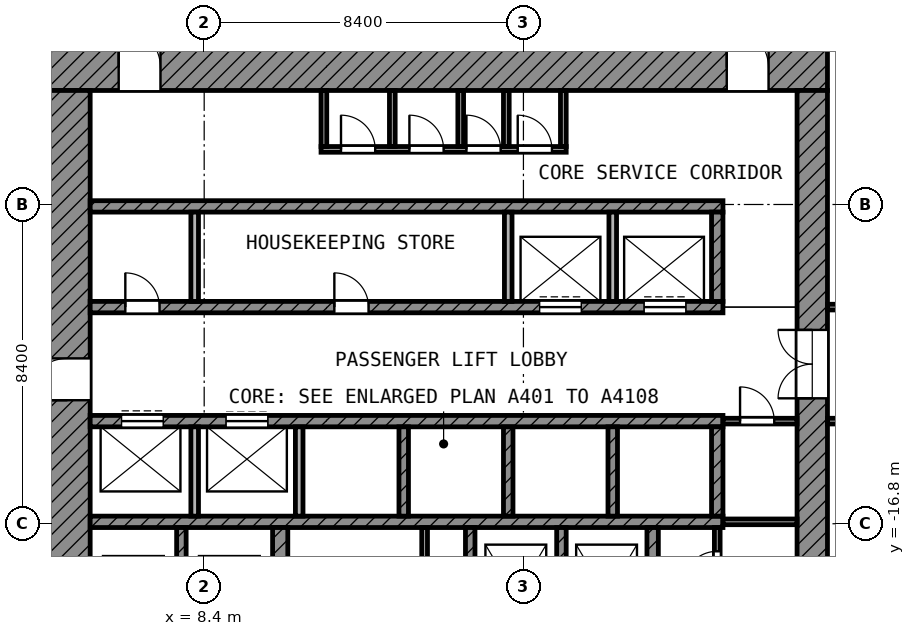
"""IFC4 building model, lengths in metres.
Left out: names, types, materials, properties, quantities, classifications, styles, units other than length and angle.
Written with IfcOpenShell. Run it as: python <this file> out.ifc"""

import sys

from ifc_helpers import new_model, si_unit, direction, frame, frame_2d, origin, place, context, subcontext, project, spatial, rectangle, extrude, element, fill, save


model = new_model("IFC4")
c1 = context("Model", 3, precision=1e-05, world=origin(), true_north=direction((0.0, 1.0)))
c2 = subcontext(c1, "Body", "Model", "MODEL_VIEW")
j1 = project(units=[si_unit("LENGTHUNIT", "METRE"), si_unit("PLANEANGLEUNIT", "RADIAN")], contexts=[c1])
p1 = place(None, origin())
s1 = spatial("IfcSite", under=j1, at=p1, CompositionType="ELEMENT")
p2 = place(p1, origin())
s2 = spatial("IfcBuilding", under=s1, at=p2, CompositionType="ELEMENT")
p3 = place(p2, frame((0.0, 0.0, 243.2)))
s3 = spatial("IfcBuildingStorey", under=s2, at=p3, CompositionType="ELEMENT", Elevation=243.2)
p4 = place(p3, frame((4.2, -4.8, 0.0), z_axis=(0.0, 0.0, 1.0), x_axis=(1.0, 0.0, 0.0)))
e1 = element("IfcWall", 1, at=p4, inside=s3, PredefinedType="SHEAR", context=c2, shape_type="SweptSolid", body=[
    extrude(rectangle(XDim=20.6, YDim=1.2, at=frame_2d((10.3, 0.0))), origin(), (0.0, 0.0, 1.0), 3.6),
])
p5 = place(p4, frame((1.95, 0.0, 0.0)))
e2 = element("IfcOpeningElement", 2, at=p5, cuts=e1, PredefinedType="OPENING", context=c2, shape_type="SweptSolid", body=[
    extrude(rectangle(XDim=1.1, YDim=2.1, at=frame_2d((0.55, 1.05))), frame((0.0, 0.61, 0.0), z_axis=(0.0, -1.0, 0.0), x_axis=(1.0, 0.0, 0.0)), (0.0, 0.0, 1.0), 1.22),
])
p6 = place(p4, frame((17.95, 0.0, 0.0)))
e3 = element("IfcOpeningElement", 3, at=p6, cuts=e1, PredefinedType="OPENING", context=c2, shape_type="SweptSolid", body=[
    extrude(rectangle(XDim=1.1, YDim=2.1, at=frame_2d((0.55, 1.05))), frame((0.0, 0.61, 0.0), z_axis=(0.0, -1.0, 0.0), x_axis=(1.0, 0.0, 0.0)), (0.0, 0.0, 1.0), 1.22),
])
p7 = place(p3, frame((4.8, -24.8, 0.0), z_axis=(0.0, 0.0, 1.0), x_axis=(0.0, 1.0, 0.0)))
e4 = element("IfcWall", 4, at=p7, inside=s3, PredefinedType="SHEAR", context=c2, shape_type="SweptSolid", body=[
    extrude(rectangle(XDim=19.4, YDim=1.2, at=frame_2d((9.7, 0.0))), origin(), (0.0, 0.0, 1.0), 3.6),
])
p8 = place(p7, frame((11.25, 0.0, 0.0)))
e5 = element("IfcOpeningElement", 5, at=p8, cuts=e4, PredefinedType="OPENING", context=c2, shape_type="SweptSolid", body=[
    extrude(rectangle(XDim=1.1, YDim=2.1, at=frame_2d((0.55, 1.05))), frame((0.0, 0.61, 0.0), z_axis=(0.0, -1.0, 0.0), x_axis=(1.0, 0.0, 0.0)), (0.0, 0.0, 1.0), 1.22),
])
p9 = place(p7, frame((1.95, 0.0, 0.0)))
e6 = element("IfcOpeningElement", 6, at=p9, cuts=e4, PredefinedType="OPENING", context=c2, shape_type="SweptSolid", body=[
    extrude(rectangle(XDim=1.1, YDim=2.1, at=frame_2d((0.55, 1.05))), frame((0.0, 0.61, 0.0), z_axis=(0.0, -1.0, 0.0), x_axis=(1.0, 0.0, 0.0)), (0.0, 0.0, 1.0), 1.22),
])
p10 = place(p3, frame((24.4, -24.0, 0.0), z_axis=(0.0, 0.0, 1.0), x_axis=(0.0, 1.0, 0.0)))
e7 = element("IfcWall", 7, at=p10, inside=s3, PredefinedType="SHEAR", context=c2, shape_type="SweptSolid", body=[
    extrude(rectangle(XDim=18.6, YDim=0.8, at=frame_2d((9.3, 0.0))), origin(), (0.0, 0.0, 1.0), 3.6),
])
p11 = place(p10, frame((10.5, 0.0, 0.0)))
e8 = element("IfcOpeningElement", 8, at=p11, cuts=e7, PredefinedType="OPENING", context=c2, shape_type="SweptSolid", body=[
    extrude(rectangle(XDim=1.8, YDim=2.1, at=frame_2d((0.9, 1.05))), frame((0.0, 0.41, 0.0), z_axis=(0.0, -1.0, 0.0), x_axis=(1.0, 0.0, 0.0)), (0.0, 0.0, 1.0), 0.82),
])
p12 = place(p3, frame((5.4, -8.45, 0.0), z_axis=(0.0, 0.0, 1.0), x_axis=(1.0, 0.0, 0.0)))
e9 = element("IfcWall", 9, at=p12, inside=s3, PredefinedType="SHEAR", context=c2, shape_type="SweptSolid", body=[
    extrude(rectangle(XDim=16.65, YDim=0.3, at=frame_2d((8.325, 0.0))), origin(), (0.0, 0.0, 1.0), 3.6),
])
p13 = place(p3, frame((5.4, -11.1, 0.0), z_axis=(0.0, 0.0, 1.0), x_axis=(1.0, 0.0, 0.0)))
e10 = element("IfcWall", 10, at=p13, inside=s3, PredefinedType="SHEAR", context=c2, shape_type="SweptSolid", body=[
    extrude(rectangle(XDim=16.65, YDim=0.3, at=frame_2d((8.325, 0.0))), origin(), (0.0, 0.0, 1.0), 3.6),
])
p14 = place(p13, frame((11.825, 0.0, 0.0)))
e11 = element("IfcOpeningElement", 11, at=p14, cuts=e10, PredefinedType="OPENING", context=c2, shape_type="SweptSolid", body=[
    extrude(rectangle(XDim=1.1, YDim=2.1, at=frame_2d((0.55, 1.05))), frame((0.0, 0.16, 0.0), z_axis=(0.0, -1.0, 0.0), x_axis=(1.0, 0.0, 0.0)), (0.0, 0.0, 1.0), 0.32),
])
p15 = place(p13, frame((14.575, 0.0, 0.0)))
e12 = element("IfcOpeningElement", 12, at=p15, cuts=e10, PredefinedType="OPENING", context=c2, shape_type="SweptSolid", body=[
    extrude(rectangle(XDim=1.1, YDim=2.1, at=frame_2d((0.55, 1.05))), frame((0.0, 0.16, 0.0), z_axis=(0.0, -1.0, 0.0), x_axis=(1.0, 0.0, 0.0)), (0.0, 0.0, 1.0), 0.32),
])
p16 = place(p13, frame((0.925, 0.0, 0.0)))
e13 = element("IfcOpeningElement", 13, at=p16, cuts=e10, PredefinedType="OPENING", context=c2, shape_type="SweptSolid", body=[
    extrude(rectangle(XDim=0.9, YDim=2.1, at=frame_2d((0.45, 1.05))), frame((0.0, 0.16, 0.0), z_axis=(0.0, -1.0, 0.0), x_axis=(1.0, 0.0, 0.0)), (0.0, 0.0, 1.0), 0.32),
])
p17 = place(p13, frame((6.425, 0.0, 0.0)))
e14 = element("IfcOpeningElement", 14, at=p17, cuts=e10, PredefinedType="OPENING", context=c2, shape_type="SweptSolid", body=[
    extrude(rectangle(XDim=0.9, YDim=2.1, at=frame_2d((0.45, 1.05))), frame((0.0, 0.16, 0.0), z_axis=(0.0, -1.0, 0.0), x_axis=(1.0, 0.0, 0.0)), (0.0, 0.0, 1.0), 0.32),
])
p18 = place(p3, frame((5.4, -14.1, 0.0), z_axis=(0.0, 0.0, 1.0), x_axis=(1.0, 0.0, 0.0)))
e15 = element("IfcWall", 15, at=p18, inside=s3, PredefinedType="SHEAR", context=c2, shape_type="SweptSolid", body=[
    extrude(rectangle(XDim=16.65, YDim=0.3, at=frame_2d((8.325, 0.0))), origin(), (0.0, 0.0, 1.0), 3.6),
])
p19 = place(p18, frame((0.825, 0.0, 0.0)))
e16 = element("IfcOpeningElement", 16, at=p19, cuts=e15, PredefinedType="OPENING", context=c2, shape_type="SweptSolid", body=[
    extrude(rectangle(XDim=1.1, YDim=2.1, at=frame_2d((0.55, 1.05))), frame((0.0, 0.16, 0.0), z_axis=(0.0, -1.0, 0.0), x_axis=(1.0, 0.0, 0.0)), (0.0, 0.0, 1.0), 0.32),
])
p20 = place(p18, frame((3.575, 0.0, 0.0)))
e17 = element("IfcOpeningElement", 17, at=p20, cuts=e15, PredefinedType="OPENING", context=c2, shape_type="SweptSolid", body=[
    extrude(rectangle(XDim=1.1, YDim=2.1, at=frame_2d((0.55, 1.05))), frame((0.0, 0.16, 0.0), z_axis=(0.0, -1.0, 0.0), x_axis=(1.0, 0.0, 0.0)), (0.0, 0.0, 1.0), 0.32),
])
p21 = place(p3, frame((5.4, -16.75, 0.0), z_axis=(0.0, 0.0, 1.0), x_axis=(1.0, 0.0, 0.0)))
e18 = element("IfcWall", 18, at=p21, inside=s3, PredefinedType="SHEAR", context=c2, shape_type="SweptSolid", body=[
    extrude(rectangle(XDim=16.65, YDim=0.3, at=frame_2d((8.325, 0.0))), origin(), (0.0, 0.0, 1.0), 3.6),
])
p22 = place(p3, frame((10.4, -20.05, 0.0), z_axis=(0.0, 0.0, 1.0), x_axis=(0.0, 1.0, 0.0)))
e19 = element("IfcWall", 19, at=p22, inside=s3, PredefinedType="SHEAR", context=c2, shape_type="SweptSolid", body=[
    extrude(rectangle(XDim=3.15, YDim=0.4, at=frame_2d((1.575, 0.0))), origin(), (0.0, 0.0, 1.0), 3.6),
])
p23 = place(p3, frame((20.2, -20.35, 0.0), z_axis=(0.0, 0.0, 1.0), x_axis=(0.0, 1.0, 0.0)))
e20 = element("IfcWall", 20, at=p23, inside=s3, PredefinedType="SHEAR", context=c2, shape_type="SweptSolid", body=[
    extrude(rectangle(XDim=3.45, YDim=0.3, at=frame_2d((1.725, 0.0))), origin(), (0.0, 0.0, 1.0), 3.6),
])
p24 = place(p3, frame((21.9, -10.95, 0.0), z_axis=(0.0, 0.0, 1.0), x_axis=(0.0, 1.0, 0.0)))
e21 = element("IfcWall", 21, at=p24, inside=s3, PredefinedType="SHEAR", context=c2, shape_type="SweptSolid", body=[
    extrude(rectangle(XDim=2.35, YDim=0.3, at=frame_2d((1.175, 0.0))), origin(), (0.0, 0.0, 1.0), 3.6),
])
p25 = place(p3, frame((21.9, -16.6, 0.0), z_axis=(0.0, 0.0, 1.0), x_axis=(0.0, 1.0, 0.0)))
e22 = element("IfcWall", 22, at=p25, inside=s3, PredefinedType="SHEAR", context=c2, shape_type="SweptSolid", body=[
    extrude(rectangle(XDim=2.35, YDim=0.3, at=frame_2d((1.175, 0.0))), origin(), (0.0, 0.0, 1.0), 3.6),
])
for number, where, z_axis, x_axis in (
    (23, (7.8, -20.05, 0.0), (0.0, 0.0, 1.0), (0.0, 1.0, 0.0)),
    (24, (15.4, -20.05, 0.0), (0.0, 0.0, 1.0), (0.0, 1.0, 0.0)),
    (25, (17.8, -20.05, 0.0), (0.0, 0.0, 1.0), (0.0, 1.0, 0.0)),
):
    element("IfcWall", number, at=place(p3, frame(where, z_axis=z_axis, x_axis=x_axis)), inside=s3, PredefinedType="SHEAR", context=c2, shape_type="SweptSolid", body=[
        extrude(rectangle(XDim=3.15, YDim=0.25, at=frame_2d((1.575, 0.0))), origin(), (0.0, 0.0, 1.0), 3.6),
    ])
for number, where, z_axis, x_axis in (
    (26, (8.15, -10.95, 0.0), (0.0, 0.0, 1.0), (0.0, 1.0, 0.0)),
    (27, (16.4, -10.95, 0.0), (0.0, 0.0, 1.0), (0.0, 1.0, 0.0)),
    (28, (19.15, -10.95, 0.0), (0.0, 0.0, 1.0), (0.0, 1.0, 0.0)),
):
    element("IfcWall", number, at=place(p3, frame(where, z_axis=z_axis, x_axis=x_axis)), inside=s3, PredefinedType="PARTITIONING", context=c2, shape_type="SweptSolid", body=[
        extrude(rectangle(XDim=2.35, YDim=0.2, at=frame_2d((1.175, 0.0))), origin(), (0.0, 0.0, 1.0), 3.6),
    ])
for number, where, z_axis, x_axis in (
    (29, (8.15, -16.6, 0.0), (0.0, 0.0, 1.0), (0.0, 1.0, 0.0)),
    (30, (10.9, -16.6, 0.0), (0.0, 0.0, 1.0), (0.0, 1.0, 0.0)),
):
    element("IfcWall", number, at=place(p3, frame(where, z_axis=z_axis, x_axis=x_axis)), inside=s3, PredefinedType="PARTITIONING", context=c2, shape_type="SweptSolid", body=[
        extrude(rectangle(XDim=2.35, YDim=0.2, at=frame_2d((1.175, 0.0))), origin(), (0.0, 0.0, 1.0), 3.6),
    ])
for number, where, z_axis, x_axis in (
    (31, (13.65, -16.6, 0.0), (0.0, 0.0, 1.0), (0.0, 1.0, 0.0)),
    (32, (16.4, -16.6, 0.0), (0.0, 0.0, 1.0), (0.0, 1.0, 0.0)),
    (33, (19.15, -16.6, 0.0), (0.0, 0.0, 1.0), (0.0, 1.0, 0.0)),
):
    element("IfcWall", number, at=place(p3, frame(where, z_axis=z_axis, x_axis=x_axis)), inside=s3, PredefinedType="SHEAR", context=c2, shape_type="SweptSolid", body=[
        extrude(rectangle(XDim=2.35, YDim=0.25, at=frame_2d((1.175, 0.0))), origin(), (0.0, 0.0, 1.0), 3.6),
    ])
p26 = place(p3, frame((21.9, -19.05, 0.0), z_axis=(0.0, 0.0, 1.0), x_axis=(0.0, 1.0, 0.0)))
e34 = element("IfcWall", 34, at=p26, inside=s3, PredefinedType="PARTITIONING", context=c2, shape_type="SweptSolid", body=[
    extrude(rectangle(XDim=2.15, YDim=0.15, at=frame_2d((1.075, 0.0))), origin(), (0.0, 0.0, 1.0), 3.6),
])
p27 = place(p26, frame((0.625, 0.0, 0.0)))
e35 = element("IfcOpeningElement", 35, at=p27, cuts=e34, PredefinedType="OPENING", context=c2, shape_type="SweptSolid", body=[
    extrude(rectangle(XDim=0.9, YDim=2.1, at=frame_2d((0.45, 1.05))), frame((0.0, 0.085, 0.0), z_axis=(0.0, -1.0, 0.0), x_axis=(1.0, 0.0, 0.0)), (0.0, 0.0, 1.0), 0.17),
])
p28 = place(p3, frame((22.05, -16.75, 0.0), z_axis=(0.0, 0.0, 1.0), x_axis=(1.0, 0.0, 0.0)))
e36 = element("IfcWall", 36, at=p28, inside=s3, PredefinedType="PARTITIONING", context=c2, shape_type="SweptSolid", body=[
    extrude(rectangle(XDim=1.95, YDim=0.15, at=frame_2d((0.975, 0.0))), origin(), (0.0, 0.0, 1.0), 3.6),
])
p29 = place(p3, frame((22.05, -14.1, 0.0), z_axis=(0.0, 0.0, 1.0), x_axis=(1.0, 0.0, 0.0)))
e37 = element("IfcWall", 37, at=p29, inside=s3, PredefinedType="PARTITIONING", context=c2, shape_type="SweptSolid", body=[
    extrude(rectangle(XDim=1.95, YDim=0.15, at=frame_2d((0.975, 0.0))), origin(), (0.0, 0.0, 1.0), 3.6),
])
p30 = place(p29, frame((0.45, 0.0, 0.0)))
e38 = element("IfcOpeningElement", 38, at=p30, cuts=e37, PredefinedType="OPENING", context=c2, shape_type="SweptSolid", body=[
    extrude(rectangle(XDim=0.9, YDim=2.1, at=frame_2d((0.45, 1.05))), frame((0.0, 0.085, 0.0), z_axis=(0.0, -1.0, 0.0), x_axis=(1.0, 0.0, 0.0)), (0.0, 0.0, 1.0), 0.17),
])
p31 = place(p3, frame((11.475, -6.95, 0.0), z_axis=(0.0, 0.0, 1.0), x_axis=(1.0, 0.0, 0.0)))
e39 = element("IfcWall", 39, at=p31, inside=s3, PredefinedType="PARTITIONING", context=c2, shape_type="SweptSolid", body=[
    extrude(rectangle(XDim=6.45, YDim=0.15, at=frame_2d((3.225, 0.0))), origin(), (0.0, 0.0, 1.0), 3.6),
])
p32 = place(p31, frame((0.525, 0.0, 0.0)))
e40 = element("IfcOpeningElement", 40, at=p32, cuts=e39, PredefinedType="OPENING", context=c2, shape_type="SweptSolid", body=[
    extrude(rectangle(XDim=0.9, YDim=2.1, at=frame_2d((0.45, 1.05))), frame((0.0, 0.085, 0.0), z_axis=(0.0, -1.0, 0.0), x_axis=(1.0, 0.0, 0.0)), (0.0, 0.0, 1.0), 0.17),
])
p33 = place(p31, frame((2.325, 0.0, 0.0)))
e41 = element("IfcOpeningElement", 41, at=p33, cuts=e39, PredefinedType="OPENING", context=c2, shape_type="SweptSolid", body=[
    extrude(rectangle(XDim=0.9, YDim=2.1, at=frame_2d((0.45, 1.05))), frame((0.0, 0.085, 0.0), z_axis=(0.0, -1.0, 0.0), x_axis=(1.0, 0.0, 0.0)), (0.0, 0.0, 1.0), 0.17),
])
p34 = place(p31, frame((3.825, 0.0, 0.0)))
e42 = element("IfcOpeningElement", 42, at=p34, cuts=e39, PredefinedType="OPENING", context=c2, shape_type="SweptSolid", body=[
    extrude(rectangle(XDim=0.9, YDim=2.1, at=frame_2d((0.45, 1.05))), frame((0.0, 0.085, 0.0), z_axis=(0.0, -1.0, 0.0), x_axis=(1.0, 0.0, 0.0)), (0.0, 0.0, 1.0), 0.17),
])
p35 = place(p31, frame((5.175, 0.0, 0.0)))
e43 = element("IfcOpeningElement", 43, at=p35, cuts=e39, PredefinedType="OPENING", context=c2, shape_type="SweptSolid", body=[
    extrude(rectangle(XDim=0.9, YDim=2.1, at=frame_2d((0.45, 1.05))), frame((0.0, 0.085, 0.0), z_axis=(0.0, -1.0, 0.0), x_axis=(1.0, 0.0, 0.0)), (0.0, 0.0, 1.0), 0.17),
])
for number, where, z_axis, x_axis in (
    (44, (11.55, -6.875, 0.0), (0.0, 0.0, 1.0), (0.0, 1.0, 0.0)),
    (45, (13.35, -6.875, 0.0), (0.0, 0.0, 1.0), (0.0, 1.0, 0.0)),
):
    element("IfcWall", number, at=place(p3, frame(where, z_axis=z_axis, x_axis=x_axis)), inside=s3, PredefinedType="PARTITIONING", context=c2, shape_type="SweptSolid", body=[
        extrude(rectangle(XDim=1.475, YDim=0.15, at=frame_2d((0.738, 0.0))), origin(), (0.0, 0.0, 1.0), 3.6),
    ])
p36 = place(p3, frame((14.2, -20.05, 0.0), z_axis=(0.0, 0.0, 1.0), x_axis=(0.0, 1.0, 0.0)))
e46 = element("IfcWall", 46, at=p36, inside=s3, PredefinedType="PARTITIONING", context=c2, shape_type="SweptSolid", body=[
    extrude(rectangle(XDim=3.15, YDim=0.15, at=frame_2d((1.575, 0.0))), origin(), (0.0, 0.0, 1.0), 3.6),
])
for number, where, z_axis, x_axis in (
    (47, (15.15, -6.875, 0.0), (0.0, 0.0, 1.0), (0.0, 1.0, 0.0)),
    (48, (16.35, -6.875, 0.0), (0.0, 0.0, 1.0), (0.0, 1.0, 0.0)),
    (49, (17.85, -6.875, 0.0), (0.0, 0.0, 1.0), (0.0, 1.0, 0.0)),
):
    element("IfcWall", number, at=place(p3, frame(where, z_axis=z_axis, x_axis=x_axis)), inside=s3, PredefinedType="PARTITIONING", context=c2, shape_type="SweptSolid", body=[
        extrude(rectangle(XDim=1.475, YDim=0.15, at=frame_2d((0.738, 0.0))), origin(), (0.0, 0.0, 1.0), 3.6),
    ])
p37 = place(p3, frame((24.8, -14.1, 0.0), z_axis=(0.0, 0.0, 1.0), x_axis=(1.0, 0.0, 0.0)))
e50 = element("IfcWall", 50, at=p37, inside=s3, PredefinedType="PARTITIONING", context=c2, shape_type="SweptSolid", body=[
    extrude(rectangle(XDim=4.525, YDim=0.15, at=frame_2d((2.262, 0.0))), origin(), (0.0, 0.0, 1.0), 3.6),
])
p38 = place(p37, frame((1.75, 0.0, 0.0)))
e51 = element("IfcOpeningElement", 51, at=p38, cuts=e50, PredefinedType="OPENING", context=c2, shape_type="SweptSolid", body=[
    extrude(rectangle(XDim=1.5, YDim=2.1, at=frame_2d((0.75, 1.05))), frame((0.0, 0.085, 0.0), z_axis=(0.0, -1.0, 0.0), x_axis=(1.0, 0.0, 0.0)), (0.0, 0.0, 1.0), 0.17),
])
p39 = place(p3, frame((24.8, -11.1, 0.0), z_axis=(0.0, 0.0, 1.0), x_axis=(1.0, 0.0, 0.0)))
e52 = element("IfcWall", 52, at=p39, inside=s3, PredefinedType="PARTITIONING", context=c2, shape_type="SweptSolid", body=[
    extrude(rectangle(XDim=4.6, YDim=0.15, at=frame_2d((2.3, 0.0))), origin(), (0.0, 0.0, 1.0), 3.6),
])
p40 = place(p39, frame((1.85, 0.0, 0.0)))
e53 = element("IfcOpeningElement", 53, at=p40, cuts=e52, PredefinedType="OPENING", context=c2, shape_type="SweptSolid", body=[
    extrude(rectangle(XDim=1.0, YDim=2.1, at=frame_2d((0.5, 1.05))), frame((0.0, 0.085, 0.0), z_axis=(0.0, -1.0, 0.0), x_axis=(1.0, 0.0, 0.0)), (0.0, 0.0, 1.0), 0.17),
])
p41 = place(p14, origin())
e54 = element("IfcDoor", 54, at=p41, inside=s3, OperationType="DOUBLE_DOOR_SLIDING", PredefinedType="DOOR", context=c2, shape_type="SweptSolid", body=[
    extrude(rectangle(XDim=1.1, YDim=2.1, at=frame_2d((0.55, 1.05))), frame((0.0, 0.025, 0.0), z_axis=(0.0, -1.0, 0.0), x_axis=(1.0, 0.0, 0.0)), (0.0, 0.0, 1.0), 0.05),
])
fill(e11, e54)
p42 = place(p15, origin())
e55 = element("IfcDoor", 55, at=p42, inside=s3, OperationType="DOUBLE_DOOR_SLIDING", PredefinedType="DOOR", context=c2, shape_type="SweptSolid", body=[
    extrude(rectangle(XDim=1.1, YDim=2.1, at=frame_2d((0.55, 1.05))), frame((0.0, 0.025, 0.0), z_axis=(0.0, -1.0, 0.0), x_axis=(1.0, 0.0, 0.0)), (0.0, 0.0, 1.0), 0.05),
])
fill(e12, e55)
p43 = place(p19, origin())
e56 = element("IfcDoor", 56, at=p43, inside=s3, OperationType="DOUBLE_DOOR_SLIDING", PredefinedType="DOOR", context=c2, shape_type="SweptSolid", body=[
    extrude(rectangle(XDim=1.1, YDim=2.1, at=frame_2d((0.55, 1.05))), frame((0.0, 0.025, 0.0), z_axis=(0.0, -1.0, 0.0), x_axis=(1.0, 0.0, 0.0)), (0.0, 0.0, 1.0), 0.05),
])
fill(e16, e56)
p44 = place(p20, origin())
e57 = element("IfcDoor", 57, at=p44, inside=s3, OperationType="DOUBLE_DOOR_SLIDING", PredefinedType="DOOR", context=c2, shape_type="SweptSolid", body=[
    extrude(rectangle(XDim=1.1, YDim=2.1, at=frame_2d((0.55, 1.05))), frame((0.0, 0.025, 0.0), z_axis=(0.0, -1.0, 0.0), x_axis=(1.0, 0.0, 0.0)), (0.0, 0.0, 1.0), 0.05),
])
fill(e17, e57)
p45 = place(p8, origin())
e58 = element("IfcDoor", 58, at=p45, inside=s3, OperationType="SINGLE_SWING_LEFT", PredefinedType="DOOR", context=c2, shape_type="SweptSolid", body=[
    extrude(rectangle(XDim=1.1, YDim=2.1, at=frame_2d((0.55, 1.05))), frame((0.0, 0.025, 0.0), z_axis=(0.0, -1.0, 0.0), x_axis=(1.0, 0.0, 0.0)), (0.0, 0.0, 1.0), 0.05),
])
fill(e5, e58)
p46 = place(p5, origin())
e59 = element("IfcDoor", 59, at=p46, inside=s3, OperationType="SINGLE_SWING_LEFT", PredefinedType="DOOR", context=c2, shape_type="SweptSolid", body=[
    extrude(rectangle(XDim=1.1, YDim=2.1, at=frame_2d((0.55, 1.05))), frame((0.0, 0.025, 0.0), z_axis=(0.0, -1.0, 0.0), x_axis=(1.0, 0.0, 0.0)), (0.0, 0.0, 1.0), 0.05),
])
fill(e2, e59)
p47 = place(p6, origin())
e60 = element("IfcDoor", 60, at=p47, inside=s3, OperationType="SINGLE_SWING_LEFT", PredefinedType="DOOR", context=c2, shape_type="SweptSolid", body=[
    extrude(rectangle(XDim=1.1, YDim=2.1, at=frame_2d((0.55, 1.05))), frame((0.0, 0.025, 0.0), z_axis=(0.0, -1.0, 0.0), x_axis=(1.0, 0.0, 0.0)), (0.0, 0.0, 1.0), 0.05),
])
fill(e3, e60)
p48 = place(p11, origin())
e61 = element("IfcDoor", 61, at=p48, inside=s3, OperationType="DOUBLE_DOOR_SINGLE_SWING", PredefinedType="DOOR", context=c2, shape_type="SweptSolid", body=[
    extrude(rectangle(XDim=1.8, YDim=2.1, at=frame_2d((0.9, 1.05))), frame((0.0, 0.025, 0.0), z_axis=(0.0, -1.0, 0.0), x_axis=(1.0, 0.0, 0.0)), (0.0, 0.0, 1.0), 0.05),
])
fill(e8, e61)
p49 = place(p32, origin())
e62 = element("IfcDoor", 62, at=p49, inside=s3, OperationType="SINGLE_SWING_LEFT", PredefinedType="DOOR", context=c2, shape_type="SweptSolid", body=[
    extrude(rectangle(XDim=0.9, YDim=2.1, at=frame_2d((0.45, 1.05))), frame((0.0, 0.025, 0.0), z_axis=(0.0, -1.0, 0.0), x_axis=(1.0, 0.0, 0.0)), (0.0, 0.0, 1.0), 0.05),
])
fill(e40, e62)
p50 = place(p33, origin())
e63 = element("IfcDoor", 63, at=p50, inside=s3, OperationType="SINGLE_SWING_LEFT", PredefinedType="DOOR", context=c2, shape_type="SweptSolid", body=[
    extrude(rectangle(XDim=0.9, YDim=2.1, at=frame_2d((0.45, 1.05))), frame((0.0, 0.025, 0.0), z_axis=(0.0, -1.0, 0.0), x_axis=(1.0, 0.0, 0.0)), (0.0, 0.0, 1.0), 0.05),
])
fill(e41, e63)
p51 = place(p34, origin())
e64 = element("IfcDoor", 64, at=p51, inside=s3, OperationType="SINGLE_SWING_LEFT", PredefinedType="DOOR", context=c2, shape_type="SweptSolid", body=[
    extrude(rectangle(XDim=0.9, YDim=2.1, at=frame_2d((0.45, 1.05))), frame((0.0, 0.025, 0.0), z_axis=(0.0, -1.0, 0.0), x_axis=(1.0, 0.0, 0.0)), (0.0, 0.0, 1.0), 0.05),
])
fill(e42, e64)
p52 = place(p35, origin())
e65 = element("IfcDoor", 65, at=p52, inside=s3, OperationType="SINGLE_SWING_LEFT", PredefinedType="DOOR", context=c2, shape_type="SweptSolid", body=[
    extrude(rectangle(XDim=0.9, YDim=2.1, at=frame_2d((0.45, 1.05))), frame((0.0, 0.025, 0.0), z_axis=(0.0, -1.0, 0.0), x_axis=(1.0, 0.0, 0.0)), (0.0, 0.0, 1.0), 0.05),
])
fill(e43, e65)
p53 = place(p30, origin())
e66 = element("IfcDoor", 66, at=p53, inside=s3, OperationType="SINGLE_SWING_LEFT", PredefinedType="DOOR", context=c2, shape_type="SweptSolid", body=[
    extrude(rectangle(XDim=0.9, YDim=2.1, at=frame_2d((0.45, 1.05))), frame((0.0, 0.025, 0.0), z_axis=(0.0, -1.0, 0.0), x_axis=(1.0, 0.0, 0.0)), (0.0, 0.0, 1.0), 0.05),
])
fill(e38, e66)
p54 = place(p27, origin())
e67 = element("IfcDoor", 67, at=p54, inside=s3, OperationType="SINGLE_SWING_LEFT", PredefinedType="DOOR", context=c2, shape_type="SweptSolid", body=[
    extrude(rectangle(XDim=0.9, YDim=2.1, at=frame_2d((0.45, 1.05))), frame((0.0, 0.025, 0.0), z_axis=(0.0, -1.0, 0.0), x_axis=(1.0, 0.0, 0.0)), (0.0, 0.0, 1.0), 0.05),
])
fill(e35, e67)
p55 = place(p16, origin())
e68 = element("IfcDoor", 68, at=p55, inside=s3, OperationType="SINGLE_SWING_LEFT", PredefinedType="DOOR", context=c2, shape_type="SweptSolid", body=[
    extrude(rectangle(XDim=0.9, YDim=2.1, at=frame_2d((0.45, 1.05))), frame((0.0, 0.025, 0.0), z_axis=(0.0, -1.0, 0.0), x_axis=(1.0, 0.0, 0.0)), (0.0, 0.0, 1.0), 0.05),
])
fill(e13, e68)
p56 = place(p17, origin())
e69 = element("IfcDoor", 69, at=p56, inside=s3, OperationType="SINGLE_SWING_LEFT", PredefinedType="DOOR", context=c2, shape_type="SweptSolid", body=[
    extrude(rectangle(XDim=0.9, YDim=2.1, at=frame_2d((0.45, 1.05))), frame((0.0, 0.025, 0.0), z_axis=(0.0, -1.0, 0.0), x_axis=(1.0, 0.0, 0.0)), (0.0, 0.0, 1.0), 0.05),
])
fill(e14, e69)
save(model, sys.argv[1])
